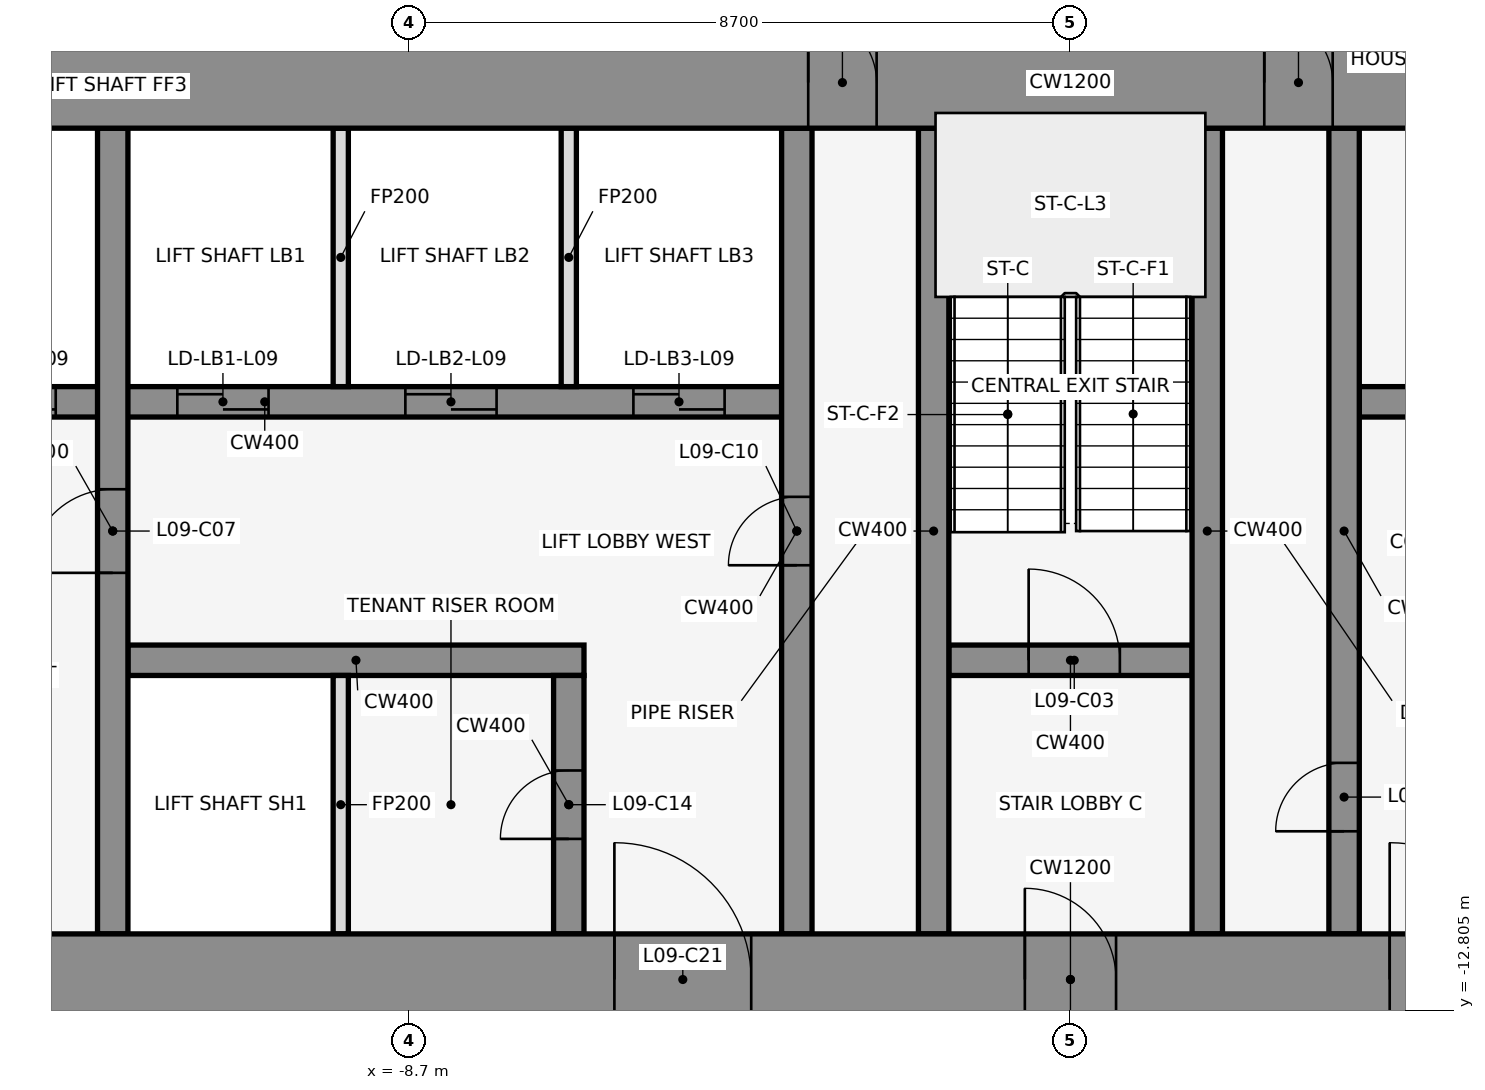
"""IFC4 building model, lengths in metres.
Left out: names, types, materials, properties, quantities, classifications, styles, units other than length and angle.
Written with IfcOpenShell. Run it as: python <this file> out.ifc"""

import sys

from ifc_helpers import new_model, si_unit, direction, frame, frame_2d, origin, place, context, subcontext, project, spatial, rectangle, extrude, element, fill, save


model = new_model("IFC4")
c1 = context("Model", 3, precision=1e-05, world=origin(), true_north=direction((0.0, 1.0)))
c2 = subcontext(c1, "Body", "Model", "MODEL_VIEW")
j1 = project(units=[si_unit("LENGTHUNIT", "METRE"), si_unit("PLANEANGLEUNIT", "RADIAN")], contexts=[c1])
p1 = place(None, origin())
s1 = spatial("IfcSite", under=j1, at=p1, CompositionType="ELEMENT")
p2 = place(p1, origin())
s2 = spatial("IfcBuilding", under=s1, at=p2, CompositionType="ELEMENT")
p3 = place(p2, frame((0.0, 0.0, 48.5)))
s3 = spatial("IfcBuildingStorey", under=s2, at=p3, CompositionType="ELEMENT", Elevation=48.5)
for number, where, z_axis, x_axis in (
    (1, (1.901, 1.08, 0.0), (0.0, 0.0, 1.0), (-0.84, -0.543, 0.0)),
    (2, (-0.068, -0.105, 0.0), (0.0, 0.0, 1.0), (-0.84, 0.543, 0.0)),
):
    element("IfcWall", number, at=place(p3, frame(where, z_axis=z_axis, x_axis=x_axis)), inside=s3, PredefinedType="STANDARD", context=c2, shape_type="SweptSolid", body=[
        extrude(rectangle(XDim=2.183, YDim=0.25, at=frame_2d((1.091, 0.0))), origin(), (0.0, 0.0, 1.0), 4.35),
    ])
p4 = place(p3, frame((-12.4, -8.2, 0.0), z_axis=(0.0, 0.0, 1.0), x_axis=(1.0, 0.0, 0.0)))
e3 = element("IfcWall", 3, at=p4, inside=s3, PredefinedType="SHEAR", context=c2, shape_type="SweptSolid", body=[
    extrude(rectangle(XDim=6.0, YDim=0.4, at=frame_2d((3.0, 0.0))), origin(), (0.0, 0.0, 1.0), 4.5),
])
p5 = place(p3, frame((-1.6, -8.2, 0.0), z_axis=(0.0, 0.0, 1.0), x_axis=(1.0, 0.0, 0.0)))
e4 = element("IfcWall", 4, at=p5, inside=s3, PredefinedType="SHEAR", context=c2, shape_type="SweptSolid", body=[
    extrude(rectangle(XDim=3.2, YDim=0.4, at=frame_2d((1.6, 0.0))), origin(), (0.0, 0.0, 1.0), 4.5),
])
p6 = place(p5, frame((1.05, 0.0, 0.0)))
e5 = element("IfcOpeningElement", 5, at=p6, cuts=e4, PredefinedType="OPENING", context=c2, shape_type="SweptSolid", body=[
    extrude(rectangle(XDim=1.2, YDim=2.1, at=frame_2d((0.6, 1.05))), frame((0.0, 0.212, 0.0), z_axis=(0.0, -1.0, 0.0), x_axis=(1.0, 0.0, 0.0)), (0.0, 0.0, 1.0), 0.424),
])
p7 = place(p3, frame((-17.4, -4.8, 0.0), z_axis=(0.0, 0.0, 1.0), x_axis=(1.0, 0.0, 0.0)))
e6 = element("IfcWall", 6, at=p7, inside=s3, PredefinedType="SHEAR", context=c2, shape_type="SweptSolid", body=[
    extrude(rectangle(XDim=13.6, YDim=0.4, at=frame_2d((6.8, 0.0))), origin(), (0.0, 0.0, 1.0), 4.5),
])
p8 = place(p7, frame((0.65, 0.0, 0.0)))
e7 = element("IfcOpeningElement", 7, at=p8, cuts=e6, PredefinedType="OPENING", context=c2, shape_type="SweptSolid", body=[
    extrude(rectangle(XDim=1.1, YDim=2.1, at=frame_2d((0.55, 1.05))), frame((0.0, 0.212, 0.0), z_axis=(0.0, -1.0, 0.0), x_axis=(1.0, 0.0, 0.0)), (0.0, 0.0, 1.0), 0.424),
])
p9 = place(p7, frame((2.95, 0.0, 0.0)))
e8 = element("IfcOpeningElement", 8, at=p9, cuts=e6, PredefinedType="OPENING", context=c2, shape_type="SweptSolid", body=[
    extrude(rectangle(XDim=1.1, YDim=2.1, at=frame_2d((0.55, 1.05))), frame((0.0, 0.212, 0.0), z_axis=(0.0, -1.0, 0.0), x_axis=(1.0, 0.0, 0.0)), (0.0, 0.0, 1.0), 0.424),
])
p10 = place(p7, frame((5.65, 0.0, 0.0)))
e9 = element("IfcOpeningElement", 9, at=p10, cuts=e6, PredefinedType="OPENING", context=c2, shape_type="SweptSolid", body=[
    extrude(rectangle(XDim=1.2, YDim=2.1, at=frame_2d((0.6, 1.05))), frame((0.0, 0.212, 0.0), z_axis=(0.0, -1.0, 0.0), x_axis=(1.0, 0.0, 0.0)), (0.0, 0.0, 1.0), 0.424),
])
p11 = place(p7, frame((8.65, 0.0, 0.0)))
e10 = element("IfcOpeningElement", 10, at=p11, cuts=e6, PredefinedType="OPENING", context=c2, shape_type="SweptSolid", body=[
    extrude(rectangle(XDim=1.2, YDim=2.1, at=frame_2d((0.6, 1.05))), frame((0.0, 0.212, 0.0), z_axis=(0.0, -1.0, 0.0), x_axis=(1.0, 0.0, 0.0)), (0.0, 0.0, 1.0), 0.424),
])
p12 = place(p7, frame((11.65, 0.0, 0.0)))
e11 = element("IfcOpeningElement", 11, at=p12, cuts=e6, PredefinedType="OPENING", context=c2, shape_type="SweptSolid", body=[
    extrude(rectangle(XDim=1.2, YDim=2.1, at=frame_2d((0.6, 1.05))), frame((0.0, 0.212, 0.0), z_axis=(0.0, -1.0, 0.0), x_axis=(1.0, 0.0, 0.0)), (0.0, 0.0, 1.0), 0.424),
])
p13 = place(p3, frame((3.8, -4.8, 0.0), z_axis=(0.0, 0.0, 1.0), x_axis=(1.0, 0.0, 0.0)))
e12 = element("IfcWall", 12, at=p13, inside=s3, PredefinedType="SHEAR", context=c2, shape_type="SweptSolid", body=[
    extrude(rectangle(XDim=13.6, YDim=0.4, at=frame_2d((6.8, 0.0))), origin(), (0.0, 0.0, 1.0), 4.5),
])
p14 = place(p13, frame((9.45, 0.0, 0.0)))
e13 = element("IfcOpeningElement", 13, at=p14, cuts=e12, PredefinedType="OPENING", context=c2, shape_type="SweptSolid", body=[
    extrude(rectangle(XDim=1.1, YDim=2.1, at=frame_2d((0.55, 1.05))), frame((0.0, 0.212, 0.0), z_axis=(0.0, -1.0, 0.0), x_axis=(1.0, 0.0, 0.0)), (0.0, 0.0, 1.0), 0.424),
])
p15 = place(p13, frame((11.85, 0.0, 0.0)))
e14 = element("IfcOpeningElement", 14, at=p15, cuts=e12, PredefinedType="OPENING", context=c2, shape_type="SweptSolid", body=[
    extrude(rectangle(XDim=1.1, YDim=2.1, at=frame_2d((0.55, 1.05))), frame((0.0, 0.212, 0.0), z_axis=(0.0, -1.0, 0.0), x_axis=(1.0, 0.0, 0.0)), (0.0, 0.0, 1.0), 0.424),
])
p16 = place(p13, frame((0.95, 0.0, 0.0)))
e15 = element("IfcOpeningElement", 15, at=p16, cuts=e12, PredefinedType="OPENING", context=c2, shape_type="SweptSolid", body=[
    extrude(rectangle(XDim=0.9, YDim=2.1, at=frame_2d((0.45, 1.05))), frame((0.0, 0.212, 0.0), z_axis=(0.0, -1.0, 0.0), x_axis=(1.0, 0.0, 0.0)), (0.0, 0.0, 1.0), 0.424),
])
p17 = place(p13, frame((5.35, 0.0, 0.0)))
e16 = element("IfcOpeningElement", 16, at=p17, cuts=e12, PredefinedType="OPENING", context=c2, shape_type="SweptSolid", body=[
    extrude(rectangle(XDim=0.9, YDim=2.1, at=frame_2d((0.45, 1.05))), frame((0.0, 0.212, 0.0), z_axis=(0.0, -1.0, 0.0), x_axis=(1.0, 0.0, 0.0)), (0.0, 0.0, 1.0), 0.424),
])
p18 = place(p3, frame((-12.6, -11.8, 0.0), z_axis=(0.0, 0.0, 1.0), x_axis=(0.0, 1.0, 0.0)))
e17 = element("IfcWall", 17, at=p18, inside=s3, PredefinedType="SHEAR", context=c2, shape_type="SweptSolid", body=[
    extrude(rectangle(XDim=10.6, YDim=0.4, at=frame_2d((5.3, 0.0))), origin(), (0.0, 0.0, 1.0), 4.5),
])
p19 = place(p18, frame((4.75, 0.0, 0.0)))
e18 = element("IfcOpeningElement", 18, at=p19, cuts=e17, PredefinedType="OPENING", context=c2, shape_type="SweptSolid", body=[
    extrude(rectangle(XDim=1.1, YDim=2.1, at=frame_2d((0.55, 1.05))), frame((0.0, 0.212, 0.0), z_axis=(0.0, -1.0, 0.0), x_axis=(1.0, 0.0, 0.0)), (0.0, 0.0, 1.0), 0.424),
])
for number, where, z_axis, x_axis in (
    (19, (-9.6, -11.8, 0.0), (0.0, 0.0, 1.0), (0.0, 1.0, 0.0)),
    (20, (-9.6, -4.6, 0.0), (0.0, 0.0, 1.0), (0.0, 1.0, 0.0)),
):
    element("IfcWall", number, at=place(p3, frame(where, z_axis=z_axis, x_axis=x_axis)), inside=s3, PredefinedType="PARTITIONING", context=c2, shape_type="SweptSolid", body=[
        extrude(rectangle(XDim=3.4, YDim=0.2, at=frame_2d((1.7, 0.0))), origin(), (0.0, 0.0, 1.0), 3.418),
    ])
p20 = place(p3, frame((-6.6, -11.8, 0.0), z_axis=(0.0, 0.0, 1.0), x_axis=(0.0, 1.0, 0.0)))
e21 = element("IfcWall", 21, at=p20, inside=s3, PredefinedType="SHEAR", context=c2, shape_type="SweptSolid", body=[
    extrude(rectangle(XDim=3.4, YDim=0.4, at=frame_2d((1.7, 0.0))), origin(), (0.0, 0.0, 1.0), 4.5),
])
p21 = place(p20, frame((1.25, 0.0, 0.0)))
e22 = element("IfcOpeningElement", 22, at=p21, cuts=e21, PredefinedType="OPENING", context=c2, shape_type="SweptSolid", body=[
    extrude(rectangle(XDim=0.9, YDim=2.1, at=frame_2d((0.45, 1.05))), frame((0.0, 0.212, 0.0), z_axis=(0.0, -1.0, 0.0), x_axis=(1.0, 0.0, 0.0)), (0.0, 0.0, 1.0), 0.424),
])
p22 = place(p3, frame((-6.6, -4.6, 0.0), z_axis=(0.0, 0.0, 1.0), x_axis=(0.0, 1.0, 0.0)))
e23 = element("IfcWall", 23, at=p22, inside=s3, PredefinedType="PARTITIONING", context=c2, shape_type="SweptSolid", body=[
    extrude(rectangle(XDim=3.4, YDim=0.2, at=frame_2d((1.7, 0.0))), origin(), (0.0, 0.0, 1.0), 3.418),
])
p23 = place(p3, frame((-3.6, -11.8, 0.0), z_axis=(0.0, 0.0, 1.0), x_axis=(0.0, 1.0, 0.0)))
e24 = element("IfcWall", 24, at=p23, inside=s3, PredefinedType="SHEAR", context=c2, shape_type="SweptSolid", body=[
    extrude(rectangle(XDim=10.6, YDim=0.4, at=frame_2d((5.3, 0.0))), origin(), (0.0, 0.0, 1.0), 4.5),
])
p24 = place(p23, frame((4.85, 0.0, 0.0)))
e25 = element("IfcOpeningElement", 25, at=p24, cuts=e24, PredefinedType="OPENING", context=c2, shape_type="SweptSolid", body=[
    extrude(rectangle(XDim=0.9, YDim=2.1, at=frame_2d((0.45, 1.05))), frame((0.0, 0.212, 0.0), z_axis=(0.0, -1.0, 0.0), x_axis=(1.0, 0.0, 0.0)), (0.0, 0.0, 1.0), 0.424),
])
for number, where, z_axis, x_axis in (
    (26, (-1.8, -11.8, 0.0), (0.0, 0.0, 1.0), (0.0, 1.0, 0.0)),
    (27, (1.8, -11.8, 0.0), (0.0, 0.0, 1.0), (0.0, 1.0, 0.0)),
):
    element("IfcWall", number, at=place(p3, frame(where, z_axis=z_axis, x_axis=x_axis)), inside=s3, PredefinedType="SHEAR", context=c2, shape_type="SweptSolid", body=[
        extrude(rectangle(XDim=10.6, YDim=0.4, at=frame_2d((5.3, 0.0))), origin(), (0.0, 0.0, 1.0), 4.5),
    ])
p25 = place(p3, frame((3.6, -11.8, 0.0), z_axis=(0.0, 0.0, 1.0), x_axis=(0.0, 1.0, 0.0)))
e28 = element("IfcWall", 28, at=p25, inside=s3, PredefinedType="SHEAR", context=c2, shape_type="SweptSolid", body=[
    extrude(rectangle(XDim=10.6, YDim=0.4, at=frame_2d((5.3, 0.0))), origin(), (0.0, 0.0, 1.0), 4.5),
])
p26 = place(p25, frame((1.35, 0.0, 0.0)))
e29 = element("IfcOpeningElement", 29, at=p26, cuts=e28, PredefinedType="OPENING", context=c2, shape_type="SweptSolid", body=[
    extrude(rectangle(XDim=0.9, YDim=2.1, at=frame_2d((0.45, 1.05))), frame((0.0, 0.212, 0.0), z_axis=(0.0, -1.0, 0.0), x_axis=(1.0, 0.0, 0.0)), (0.0, 0.0, 1.0), 0.424),
])
p27 = place(p3, frame((-22.0, -0.6, 0.0), z_axis=(0.0, 0.0, 1.0), x_axis=(1.0, 0.0, 0.0)))
e30 = element("IfcWall", 30, at=p27, inside=s3, PredefinedType="SHEAR", context=c2, shape_type="SweptSolid", body=[
    extrude(rectangle(XDim=44.0, YDim=1.2, at=frame_2d((22.0, 0.0))), origin(), (0.0, 0.0, 1.0), 4.5),
])
p28 = place(p27, frame((18.55, 0.0, 0.0)))
e31 = element("IfcOpeningElement", 31, at=p28, cuts=e30, PredefinedType="OPENING", context=c2, shape_type="SweptSolid", body=[
    extrude(rectangle(XDim=0.9, YDim=2.1, at=frame_2d((0.45, 1.05))), frame((0.0, 0.612, 0.0), z_axis=(0.0, -1.0, 0.0), x_axis=(1.0, 0.0, 0.0)), (0.0, 0.0, 1.0), 1.224),
])
p29 = place(p27, frame((24.55, 0.0, 0.0)))
e32 = element("IfcOpeningElement", 32, at=p29, cuts=e30, PredefinedType="OPENING", context=c2, shape_type="SweptSolid", body=[
    extrude(rectangle(XDim=0.9, YDim=2.1, at=frame_2d((0.45, 1.05))), frame((0.0, 0.612, 0.0), z_axis=(0.0, -1.0, 0.0), x_axis=(1.0, 0.0, 0.0)), (0.0, 0.0, 1.0), 1.224),
])
p30 = place(p3, frame((-22.0, -12.4, 0.0), z_axis=(0.0, 0.0, 1.0), x_axis=(1.0, 0.0, 0.0)))
e33 = element("IfcWall", 33, at=p30, inside=s3, PredefinedType="SHEAR", context=c2, shape_type="SweptSolid", body=[
    extrude(rectangle(XDim=44.0, YDim=1.2, at=frame_2d((22.0, 0.0))), origin(), (0.0, 0.0, 1.0), 4.5),
])
p31 = place(p30, frame((2.2, 0.0, 0.0)))
e34 = element("IfcOpeningElement", 34, at=p31, cuts=e33, PredefinedType="OPENING", context=c2, shape_type="SweptSolid", body=[
    extrude(rectangle(XDim=1.2, YDim=2.1, at=frame_2d((0.6, 1.05))), frame((0.0, 0.612, 0.0), z_axis=(0.0, -1.0, 0.0), x_axis=(1.0, 0.0, 0.0)), (0.0, 0.0, 1.0), 1.224),
])
p32 = place(p30, frame((21.4, 0.0, 0.0)))
e35 = element("IfcOpeningElement", 35, at=p32, cuts=e33, PredefinedType="OPENING", context=c2, shape_type="SweptSolid", body=[
    extrude(rectangle(XDim=1.2, YDim=2.1, at=frame_2d((0.6, 1.05))), frame((0.0, 0.612, 0.0), z_axis=(0.0, -1.0, 0.0), x_axis=(1.0, 0.0, 0.0)), (0.0, 0.0, 1.0), 1.224),
])
p33 = place(p30, frame((40.6, 0.0, 0.0)))
e36 = element("IfcOpeningElement", 36, at=p33, cuts=e33, PredefinedType="OPENING", context=c2, shape_type="SweptSolid", body=[
    extrude(rectangle(XDim=1.2, YDim=2.1, at=frame_2d((0.6, 1.05))), frame((0.0, 0.612, 0.0), z_axis=(0.0, -1.0, 0.0), x_axis=(1.0, 0.0, 0.0)), (0.0, 0.0, 1.0), 1.224),
])
p34 = place(p30, frame((16.0, 0.0, 0.0)))
e37 = element("IfcOpeningElement", 37, at=p34, cuts=e33, PredefinedType="OPENING", context=c2, shape_type="SweptSolid", body=[
    extrude(rectangle(XDim=1.8, YDim=2.1, at=frame_2d((0.9, 1.05))), frame((0.0, 0.612, 0.0), z_axis=(0.0, -1.0, 0.0), x_axis=(1.0, 0.0, 0.0)), (0.0, 0.0, 1.0), 1.224),
])
p35 = place(p30, frame((6.3, 0.0, 0.0)))
e38 = element("IfcOpeningElement", 38, at=p35, cuts=e33, PredefinedType="OPENING", context=c2, shape_type="SweptSolid", body=[
    extrude(rectangle(XDim=1.2, YDim=2.1, at=frame_2d((0.6, 1.05))), frame((0.0, 0.612, 0.0), z_axis=(0.0, -1.0, 0.0), x_axis=(1.0, 0.0, 0.0)), (0.0, 0.0, 1.0), 1.224),
])
p36 = place(p30, frame((26.2, 0.0, 0.0)))
e39 = element("IfcOpeningElement", 39, at=p36, cuts=e33, PredefinedType="OPENING", context=c2, shape_type="SweptSolid", body=[
    extrude(rectangle(XDim=1.8, YDim=2.1, at=frame_2d((0.9, 1.05))), frame((0.0, 0.612, 0.0), z_axis=(0.0, -1.0, 0.0), x_axis=(1.0, 0.0, 0.0)), (0.0, 0.0, 1.0), 1.224),
])
p37 = place(p30, frame((36.5, 0.0, 0.0)))
e40 = element("IfcOpeningElement", 40, at=p37, cuts=e33, PredefinedType="OPENING", context=c2, shape_type="SweptSolid", body=[
    extrude(rectangle(XDim=1.2, YDim=2.1, at=frame_2d((0.6, 1.05))), frame((0.0, 0.612, 0.0), z_axis=(0.0, -1.0, 0.0), x_axis=(1.0, 0.0, 0.0)), (0.0, 0.0, 1.0), 1.224),
])
p38 = place(p6, origin())
e41 = element("IfcDoor", 41, at=p38, inside=s3, OperationType="SINGLE_SWING_LEFT", PredefinedType="DOOR", context=c2, shape_type="SweptSolid", body=[
    extrude(rectangle(XDim=1.2, YDim=2.1, at=frame_2d((0.6, 1.05))), frame((0.0, 0.025, 0.0), z_axis=(0.0, -1.0, 0.0), x_axis=(1.0, 0.0, 0.0)), (0.0, 0.0, 1.0), 0.05),
])
fill(e5, e41)
p39 = place(p9, origin())
e42 = element("IfcDoor", 42, at=p39, inside=s3, OperationType="DOUBLE_DOOR_SLIDING", PredefinedType="DOOR", context=c2, shape_type="SweptSolid", body=[
    extrude(rectangle(XDim=1.1, YDim=2.1, at=frame_2d((0.55, 1.05))), frame((0.0, 0.025, 0.0), z_axis=(0.0, -1.0, 0.0), x_axis=(1.0, 0.0, 0.0)), (0.0, 0.0, 1.0), 0.05),
])
fill(e8, e42)
p40 = place(p10, origin())
e43 = element("IfcDoor", 43, at=p40, inside=s3, OperationType="DOUBLE_DOOR_SLIDING", PredefinedType="DOOR", context=c2, shape_type="SweptSolid", body=[
    extrude(rectangle(XDim=1.2, YDim=2.1, at=frame_2d((0.6, 1.05))), frame((0.0, 0.025, 0.0), z_axis=(0.0, -1.0, 0.0), x_axis=(1.0, 0.0, 0.0)), (0.0, 0.0, 1.0), 0.05),
])
fill(e9, e43)
p41 = place(p11, origin())
e44 = element("IfcDoor", 44, at=p41, inside=s3, OperationType="DOUBLE_DOOR_SLIDING", PredefinedType="DOOR", context=c2, shape_type="SweptSolid", body=[
    extrude(rectangle(XDim=1.2, YDim=2.1, at=frame_2d((0.6, 1.05))), frame((0.0, 0.025, 0.0), z_axis=(0.0, -1.0, 0.0), x_axis=(1.0, 0.0, 0.0)), (0.0, 0.0, 1.0), 0.05),
])
fill(e10, e44)
p42 = place(p12, origin())
e45 = element("IfcDoor", 45, at=p42, inside=s3, OperationType="DOUBLE_DOOR_SLIDING", PredefinedType="DOOR", context=c2, shape_type="SweptSolid", body=[
    extrude(rectangle(XDim=1.2, YDim=2.1, at=frame_2d((0.6, 1.05))), frame((0.0, 0.025, 0.0), z_axis=(0.0, -1.0, 0.0), x_axis=(1.0, 0.0, 0.0)), (0.0, 0.0, 1.0), 0.05),
])
fill(e11, e45)
p43 = place(p19, origin())
e46 = element("IfcDoor", 46, at=p43, inside=s3, OperationType="SINGLE_SWING_LEFT", PredefinedType="DOOR", context=c2, shape_type="SweptSolid", body=[
    extrude(rectangle(XDim=1.1, YDim=2.1, at=frame_2d((0.55, 1.05))), frame((0.0, 0.025, 0.0), z_axis=(0.0, -1.0, 0.0), x_axis=(1.0, 0.0, 0.0)), (0.0, 0.0, 1.0), 0.05),
])
fill(e18, e46)
p44 = place(p24, frame((0.9, 0.0, 0.0), z_axis=(0.0, 0.0, 1.0), x_axis=(-1.0, 0.0, 0.0)))
e47 = element("IfcDoor", 47, at=p44, inside=s3, OperationType="SINGLE_SWING_LEFT", PredefinedType="DOOR", context=c2, shape_type="SweptSolid", body=[
    extrude(rectangle(XDim=0.9, YDim=2.1, at=frame_2d((0.45, 1.05))), frame((0.0, 0.025, 0.0), z_axis=(0.0, -1.0, 0.0), x_axis=(1.0, 0.0, 0.0)), (0.0, 0.0, 1.0), 0.05),
])
fill(e25, e47)
p45 = place(p26, origin())
e48 = element("IfcDoor", 48, at=p45, inside=s3, OperationType="SINGLE_SWING_LEFT", PredefinedType="DOOR", context=c2, shape_type="SweptSolid", body=[
    extrude(rectangle(XDim=0.9, YDim=2.1, at=frame_2d((0.45, 1.05))), frame((0.0, 0.025, 0.0), z_axis=(0.0, -1.0, 0.0), x_axis=(1.0, 0.0, 0.0)), (0.0, 0.0, 1.0), 0.05),
])
fill(e29, e48)
p46 = place(p21, origin())
e49 = element("IfcDoor", 49, at=p46, inside=s3, OperationType="SINGLE_SWING_RIGHT", PredefinedType="DOOR", context=c2, shape_type="SweptSolid", body=[
    extrude(rectangle(XDim=0.9, YDim=2.1, at=frame_2d((0.45, 1.05))), frame((0.0, 0.025, 0.0), z_axis=(0.0, -1.0, 0.0), x_axis=(1.0, 0.0, 0.0)), (0.0, 0.0, 1.0), 0.05),
])
fill(e22, e49)
p47 = place(p28, origin())
e50 = element("IfcDoor", 50, at=p47, inside=s3, OperationType="SINGLE_SWING_LEFT", PredefinedType="DOOR", context=c2, shape_type="SweptSolid", body=[
    extrude(rectangle(XDim=0.9, YDim=2.1, at=frame_2d((0.45, 1.05))), frame((0.0, 0.025, 0.0), z_axis=(0.0, -1.0, 0.0), x_axis=(1.0, 0.0, 0.0)), (0.0, 0.0, 1.0), 0.05),
])
fill(e31, e50)
p48 = place(p29, origin())
e51 = element("IfcDoor", 51, at=p48, inside=s3, OperationType="SINGLE_SWING_LEFT", PredefinedType="DOOR", context=c2, shape_type="SweptSolid", body=[
    extrude(rectangle(XDim=0.9, YDim=2.1, at=frame_2d((0.45, 1.05))), frame((0.0, 0.025, 0.0), z_axis=(0.0, -1.0, 0.0), x_axis=(1.0, 0.0, 0.0)), (0.0, 0.0, 1.0), 0.05),
])
fill(e32, e51)
p49 = place(p32, frame((1.2, 0.0, 0.0), z_axis=(0.0, 0.0, 1.0), x_axis=(-1.0, 0.0, 0.0)))
e52 = element("IfcDoor", 52, at=p49, inside=s3, OperationType="SINGLE_SWING_RIGHT", PredefinedType="DOOR", context=c2, shape_type="SweptSolid", body=[
    extrude(rectangle(XDim=1.2, YDim=2.1, at=frame_2d((0.6, 1.05))), frame((0.0, 0.025, 0.0), z_axis=(0.0, -1.0, 0.0), x_axis=(1.0, 0.0, 0.0)), (0.0, 0.0, 1.0), 0.05),
])
fill(e35, e52)
p50 = place(p34, origin())
e53 = element("IfcDoor", 53, at=p50, inside=s3, OperationType="SINGLE_SWING_LEFT", PredefinedType="DOOR", context=c2, shape_type="SweptSolid", body=[
    extrude(rectangle(XDim=1.8, YDim=2.1, at=frame_2d((0.9, 1.05))), frame((0.0, 0.025, 0.0), z_axis=(0.0, -1.0, 0.0), x_axis=(1.0, 0.0, 0.0)), (0.0, 0.0, 1.0), 0.05),
])
fill(e37, e53)
p51 = place(p36, origin())
e54 = element("IfcDoor", 54, at=p51, inside=s3, OperationType="SINGLE_SWING_LEFT", PredefinedType="DOOR", context=c2, shape_type="SweptSolid", body=[
    extrude(rectangle(XDim=1.8, YDim=2.1, at=frame_2d((0.9, 1.05))), frame((0.0, 0.025, 0.0), z_axis=(0.0, -1.0, 0.0), x_axis=(1.0, 0.0, 0.0)), (0.0, 0.0, 1.0), 0.05),
])
fill(e39, e54)
save(model, sys.argv[1])
